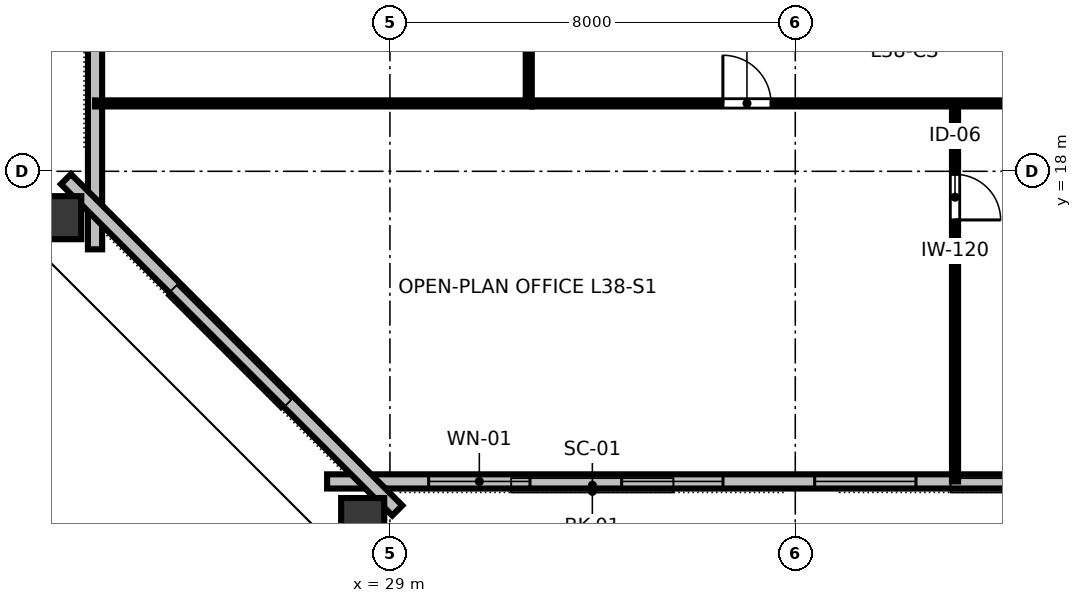
"""IFC4 building model, lengths in metres.
Left out: names, types, materials, properties, quantities, classifications, styles, units other than length and angle.
Written with IfcOpenShell. Run it as: python <this file> out.ifc"""

import sys

from ifc_helpers import new_model, si_unit, direction, frame, frame_2d, origin, origin_2d, place, context, subcontext, project, spatial, rectangle, hollow_rectangle, extrude, element, fill, save


model = new_model("IFC4")
c1 = context("Model", 3, precision=1e-05, world=origin(), true_north=direction((0.0, 1.0)))
c2 = subcontext(c1, "Body", "Model", "MODEL_VIEW")
j1 = project(units=[si_unit("LENGTHUNIT", "METRE"), si_unit("PLANEANGLEUNIT", "RADIAN")], contexts=[c1])
p1 = place(None, origin())
s1 = spatial("IfcSite", under=j1, at=p1, CompositionType="ELEMENT")
p2 = place(p1, origin())
s2 = spatial("IfcBuilding", under=s1, at=p2, CompositionType="ELEMENT")
p3 = place(p2, frame((0.0, 0.0, 145.6)))
s3 = spatial("IfcBuildingStorey", under=s2, at=p3, CompositionType="ELEMENT", Elevation=145.6)
p4 = place(p3, frame((28.462, 11.052, 0.0), z_axis=(-0.059277862286, -0.074043044101, 0.995491719033), x_axis=(0.780645414878, -0.624974188451, 0.0)))
e1 = element("IfcColumn", 1, at=p4, inside=s3, PredefinedType="COLUMN", context=c2, shape_type="SweptSolid", body=[
    extrude(hollow_rectangle(XDim=0.85, YDim=1.0, WallThickness=0.05, at=origin_2d()), origin(), (0.0, 0.0, 1.0), 3.373),
])
p5 = place(p3, frame((22.409, 17.085, 0.0), z_axis=(-0.088840732105, -0.044637403672, 0.995045137927), x_axis=(0.889124879538, 0.446734568954, 0.099424209766)))
e2 = element("IfcColumn", 2, at=p5, inside=s3, PredefinedType="COLUMN", context=c2, shape_type="SweptSolid", body=[
    extrude(hollow_rectangle(XDim=0.85, YDim=1.0, WallThickness=0.05, at=origin_2d()), origin(), (0.0, 0.0, 1.0), 3.375),
])
p6 = place(p3, frame((27.76, 11.88, 0.0), z_axis=(0.0, 0.0, 1.0), x_axis=(1.0, 0.0, 0.0)))
e3 = element("IfcWall", 3, at=p6, inside=s3, PredefinedType="STANDARD", context=c2, shape_type="SweptSolid", body=[
    extrude(rectangle(XDim=36.48, YDim=0.28, at=frame_2d((18.24, 0.0))), origin(), (0.0, 0.0, 1.0), 3.36),
])
p7 = place(p6, frame((2.004, 0.0, 0.8)))
e4 = element("IfcOpeningElement", 4, at=p7, cuts=e3, PredefinedType="OPENING", context=c2, shape_type="SweptSolid", body=[
    extrude(rectangle(XDim=2.0, YDim=1.95, at=frame_2d((1.0, 0.975))), frame((0.0, 0.15, 0.0), z_axis=(0.0, -1.0, 0.0), x_axis=(1.0, 0.0, 0.0)), (0.0, 0.0, 1.0), 0.3),
])
p8 = place(p6, frame((5.813, 0.0, 0.8)))
e5 = element("IfcOpeningElement", 5, at=p8, cuts=e3, PredefinedType="OPENING", context=c2, shape_type="SweptSolid", body=[
    extrude(rectangle(XDim=2.0, YDim=1.95, at=frame_2d((1.0, 0.975))), frame((0.0, 0.15, 0.0), z_axis=(0.0, -1.0, 0.0), x_axis=(1.0, 0.0, 0.0)), (0.0, 0.0, 1.0), 0.3),
])
p9 = place(p6, frame((9.622, 0.0, 0.8)))
e6 = element("IfcOpeningElement", 6, at=p9, cuts=e3, PredefinedType="OPENING", context=c2, shape_type="SweptSolid", body=[
    extrude(rectangle(XDim=2.0, YDim=1.95, at=frame_2d((1.0, 0.975))), frame((0.0, 0.15, 0.0), z_axis=(0.0, -1.0, 0.0), x_axis=(1.0, 0.0, 0.0)), (0.0, 0.0, 1.0), 0.3),
])
p10 = place(p6, frame((13.431, 0.0, 0.8)))
e7 = element("IfcOpeningElement", 7, at=p10, cuts=e3, PredefinedType="OPENING", context=c2, shape_type="SweptSolid", body=[
    extrude(rectangle(XDim=2.0, YDim=1.95, at=frame_2d((1.0, 0.975))), frame((0.0, 0.15, 0.0), z_axis=(0.0, -1.0, 0.0), x_axis=(1.0, 0.0, 0.0)), (0.0, 0.0, 1.0), 0.3),
])
p11 = place(p6, frame((21.049, 0.0, 0.8)))
e8 = element("IfcOpeningElement", 8, at=p11, cuts=e3, PredefinedType="OPENING", context=c2, shape_type="SweptSolid", body=[
    extrude(rectangle(XDim=2.0, YDim=1.95, at=frame_2d((1.0, 0.975))), frame((0.0, 0.15, 0.0), z_axis=(0.0, -1.0, 0.0), x_axis=(1.0, 0.0, 0.0)), (0.0, 0.0, 1.0), 0.3),
])
p12 = place(p6, frame((28.667, 0.0, 0.8)))
e9 = element("IfcOpeningElement", 9, at=p12, cuts=e3, PredefinedType="OPENING", context=c2, shape_type="SweptSolid", body=[
    extrude(rectangle(XDim=2.0, YDim=1.95, at=frame_2d((1.0, 0.975))), frame((0.0, 0.15, 0.0), z_axis=(0.0, -1.0, 0.0), x_axis=(1.0, 0.0, 0.0)), (0.0, 0.0, 1.0), 0.3),
])
p13 = place(p6, frame((32.476, 0.0, 0.8)))
e10 = element("IfcOpeningElement", 10, at=p13, cuts=e3, PredefinedType="OPENING", context=c2, shape_type="SweptSolid", body=[
    extrude(rectangle(XDim=2.0, YDim=1.95, at=frame_2d((1.0, 0.975))), frame((0.0, 0.15, 0.0), z_axis=(0.0, -1.0, 0.0), x_axis=(1.0, 0.0, 0.0)), (0.0, 0.0, 1.0), 0.3),
])
p14 = place(p3, frame((23.18, 47.54, 0.0), z_axis=(0.0, 0.0, 1.0), x_axis=(0.0, -1.0, 0.0)))
e11 = element("IfcWall", 11, at=p14, inside=s3, PredefinedType="STANDARD", context=c2, shape_type="SweptSolid", body=[
    extrude(rectangle(XDim=31.08, YDim=0.28, at=frame_2d((15.54, 0.0))), origin(), (0.0, 0.0, 1.0), 3.36),
])
p15 = place(p14, frame((11.86, 0.0, 0.0)))
e12 = element("IfcOpeningElement", 12, at=p15, cuts=e11, PredefinedType="OPENING", context=c2, shape_type="SweptSolid", body=[
    extrude(rectangle(XDim=1.4, YDim=2.15, at=frame_2d((0.7, 1.075))), frame((0.0, 0.15, 0.0), z_axis=(0.0, -1.0, 0.0), x_axis=(1.0, 0.0, 0.0)), (0.0, 0.0, 1.0), 0.3),
])
p16 = place(p14, frame((5.515, 0.0, 0.8)))
e13 = element("IfcOpeningElement", 13, at=p16, cuts=e11, PredefinedType="OPENING", context=c2, shape_type="SweptSolid", body=[
    extrude(rectangle(XDim=2.0, YDim=1.95, at=frame_2d((1.0, 0.975))), frame((0.0, 0.15, 0.0), z_axis=(0.0, -1.0, 0.0), x_axis=(1.0, 0.0, 0.0)), (0.0, 0.0, 1.0), 0.3),
])
p17 = place(p14, frame((9.125, 0.0, 0.8)))
e14 = element("IfcOpeningElement", 14, at=p17, cuts=e11, PredefinedType="OPENING", context=c2, shape_type="SweptSolid", body=[
    extrude(rectangle(XDim=2.0, YDim=1.95, at=frame_2d((1.0, 0.975))), frame((0.0, 0.15, 0.0), z_axis=(0.0, -1.0, 0.0), x_axis=(1.0, 0.0, 0.0)), (0.0, 0.0, 1.0), 0.3),
])
p18 = place(p14, frame((19.955, 0.0, 0.8)))
e15 = element("IfcOpeningElement", 15, at=p18, cuts=e11, PredefinedType="OPENING", context=c2, shape_type="SweptSolid", body=[
    extrude(rectangle(XDim=2.0, YDim=1.95, at=frame_2d((1.0, 0.975))), frame((0.0, 0.15, 0.0), z_axis=(0.0, -1.0, 0.0), x_axis=(1.0, 0.0, 0.0)), (0.0, 0.0, 1.0), 0.3),
])
p19 = place(p14, frame((23.565, 0.0, 0.8)))
e16 = element("IfcOpeningElement", 16, at=p19, cuts=e11, PredefinedType="OPENING", context=c2, shape_type="SweptSolid", body=[
    extrude(rectangle(XDim=2.0, YDim=1.95, at=frame_2d((1.0, 0.975))), frame((0.0, 0.15, 0.0), z_axis=(0.0, -1.0, 0.0), x_axis=(1.0, 0.0, 0.0)), (0.0, 0.0, 1.0), 0.3),
])
p20 = place(p3, frame((22.606, 17.845, 0.0), z_axis=(0.0, 0.0, 1.0), x_axis=(0.707106781187, -0.707106781187, 0.0)))
e17 = element("IfcWall", 17, at=p20, inside=s3, PredefinedType="STANDARD", context=c2, shape_type="SweptSolid", body=[
    extrude(rectangle(XDim=9.248, YDim=0.28, at=frame_2d((4.624, 0.0))), origin(), (0.0, 0.0, 1.0), 3.36),
])
p21 = place(p3, frame((40.152, 19.34, 0.0), z_axis=(0.0, 0.0, 1.0), x_axis=(0.0, -1.0, 0.0)))
e18 = element("IfcWall", 18, at=p21, inside=s3, PredefinedType="PARTITIONING", context=c2, shape_type="SweptSolid", body=[
    extrude(rectangle(XDim=7.46, YDim=0.12, at=frame_2d((3.73, 0.0))), origin(), (0.0, 0.0, 1.0), 2.64),
])
p22 = place(p21, frame((1.4, 0.0, 0.0)))
e19 = element("IfcOpeningElement", 19, at=p22, cuts=e18, PredefinedType="OPENING", context=c2, shape_type="SweptSolid", body=[
    extrude(rectangle(XDim=0.9, YDim=2.15, at=frame_2d((0.45, 1.075))), frame((0.0, 0.07, 0.0), z_axis=(0.0, -1.0, 0.0), x_axis=(1.0, 0.0, 0.0)), (0.0, 0.0, 1.0), 0.14),
])
p23 = place(p3, frame((31.8, 19.34, 0.0), z_axis=(0.0, 0.0, 1.0), x_axis=(1.0, 0.0, 0.0)))
e20 = element("IfcWall", 20, at=p23, inside=s3, PredefinedType="PARTITIONING", context=c2, shape_type="SweptSolid", body=[
    extrude(rectangle(XDim=28.4, YDim=0.12, at=frame_2d((14.2, 0.0))), origin(), (0.0, 0.0, 1.0), 2.64),
])
p24 = place(p23, frame((3.771, 0.0, 0.0)))
e21 = element("IfcOpeningElement", 21, at=p24, cuts=e20, PredefinedType="OPENING", context=c2, shape_type="SweptSolid", body=[
    extrude(rectangle(XDim=0.95, YDim=2.15, at=frame_2d((0.475, 1.075))), frame((0.0, 0.07, 0.0), z_axis=(0.0, -1.0, 0.0), x_axis=(1.0, 0.0, 0.0)), (0.0, 0.0, 1.0), 0.14),
])
p25 = place(p23, frame((10.068, 0.0, 0.0)))
e22 = element("IfcOpeningElement", 22, at=p25, cuts=e20, PredefinedType="OPENING", context=c2, shape_type="SweptSolid", body=[
    extrude(rectangle(XDim=0.95, YDim=2.15, at=frame_2d((0.475, 1.075))), frame((0.0, 0.07, 0.0), z_axis=(0.0, -1.0, 0.0), x_axis=(1.0, 0.0, 0.0)), (0.0, 0.0, 1.0), 0.14),
])
p26 = place(p23, frame((13.828, 0.0, 0.0)))
e23 = element("IfcOpeningElement", 23, at=p26, cuts=e20, PredefinedType="OPENING", context=c2, shape_type="SweptSolid", body=[
    extrude(rectangle(XDim=0.95, YDim=2.15, at=frame_2d((0.475, 1.075))), frame((0.0, 0.07, 0.0), z_axis=(0.0, -1.0, 0.0), x_axis=(1.0, 0.0, 0.0)), (0.0, 0.0, 1.0), 0.14),
])
p27 = place(p23, frame((18.648, 0.0, 0.0)))
e24 = element("IfcOpeningElement", 24, at=p27, cuts=e20, PredefinedType="OPENING", context=c2, shape_type="SweptSolid", body=[
    extrude(rectangle(XDim=0.95, YDim=2.15, at=frame_2d((0.475, 1.075))), frame((0.0, 0.07, 0.0), z_axis=(0.0, -1.0, 0.0), x_axis=(1.0, 0.0, 0.0)), (0.0, 0.0, 1.0), 0.14),
])
p28 = place(p23, frame((24.842, 0.0, 0.0)))
e25 = element("IfcOpeningElement", 25, at=p28, cuts=e20, PredefinedType="OPENING", context=c2, shape_type="SweptSolid", body=[
    extrude(rectangle(XDim=0.95, YDim=2.15, at=frame_2d((0.475, 1.075))), frame((0.0, 0.07, 0.0), z_axis=(0.0, -1.0, 0.0), x_axis=(1.0, 0.0, 0.0)), (0.0, 0.0, 1.0), 0.14),
])
p29 = place(p3, frame((31.74, 19.4, 0.0), z_axis=(0.0, 0.0, 1.0), x_axis=(0.0, 1.0, 0.0)))
e26 = element("IfcWall", 26, at=p29, inside=s3, PredefinedType="PARTITIONING", context=c2, shape_type="SweptSolid", body=[
    extrude(rectangle(XDim=11.58, YDim=0.12, at=frame_2d((5.79, 0.0))), origin(), (0.0, 0.0, 1.0), 2.64),
])
p30 = place(p29, frame((4.868, 0.0, 0.0)))
e27 = element("IfcOpeningElement", 27, at=p30, cuts=e26, PredefinedType="OPENING", context=c2, shape_type="SweptSolid", body=[
    extrude(rectangle(XDim=0.95, YDim=2.15, at=frame_2d((0.475, 1.075))), frame((0.0, 0.07, 0.0), z_axis=(0.0, -1.0, 0.0), x_axis=(1.0, 0.0, 0.0)), (0.0, 0.0, 1.0), 0.14),
])
p31 = place(p3, frame((31.8, 19.34, 0.0), z_axis=(0.0, 0.0, 1.0), x_axis=(-1.0, 0.0, 0.0)))
e28 = element("IfcWall", 28, at=p31, inside=s3, PredefinedType="PARTITIONING", context=c2, shape_type="SweptSolid", body=[
    extrude(rectangle(XDim=8.62, YDim=0.12, at=frame_2d((4.31, 0.0))), origin(), (0.0, 0.0, 1.0), 2.64),
])
p32 = place(p7, origin())
e29 = element("IfcWindow", 29, at=p32, inside=s3, PartitioningType="SINGLE_PANEL", PredefinedType="WINDOW", context=c2, shape_type="SweptSolid", body=[
    extrude(rectangle(XDim=2.0, YDim=1.95, at=frame_2d((1.0, 0.975))), frame((0.0, 0.03, 0.0), z_axis=(0.0, -1.0, 0.0), x_axis=(1.0, 0.0, 0.0)), (0.0, 0.0, 1.0), 0.06),
])
fill(e4, e29)
p33 = place(p8, origin())
e30 = element("IfcWindow", 30, at=p33, inside=s3, PartitioningType="SINGLE_PANEL", PredefinedType="WINDOW", context=c2, shape_type="SweptSolid", body=[
    extrude(rectangle(XDim=2.0, YDim=1.95, at=frame_2d((1.0, 0.975))), frame((0.0, 0.03, 0.0), z_axis=(0.0, -1.0, 0.0), x_axis=(1.0, 0.0, 0.0)), (0.0, 0.0, 1.0), 0.06),
])
fill(e5, e30)
p34 = place(p9, origin())
e31 = element("IfcWindow", 31, at=p34, inside=s3, PartitioningType="SINGLE_PANEL", PredefinedType="WINDOW", context=c2, shape_type="SweptSolid", body=[
    extrude(rectangle(XDim=2.0, YDim=1.95, at=frame_2d((1.0, 0.975))), frame((0.0, 0.03, 0.0), z_axis=(0.0, -1.0, 0.0), x_axis=(1.0, 0.0, 0.0)), (0.0, 0.0, 1.0), 0.06),
])
fill(e6, e31)
p35 = place(p22, origin())
e32 = element("IfcDoor", 32, at=p35, inside=s3, OperationType="SINGLE_SWING_RIGHT", PredefinedType="DOOR", context=c2, shape_type="SweptSolid", body=[
    extrude(rectangle(XDim=0.9, YDim=2.15, at=frame_2d((0.45, 1.075))), frame((0.0, 0.025, 0.0), z_axis=(0.0, -1.0, 0.0), x_axis=(1.0, 0.0, 0.0)), (0.0, 0.0, 1.0), 0.05),
])
fill(e19, e32)
p36 = place(p24, origin())
e33 = element("IfcDoor", 33, at=p36, inside=s3, OperationType="SINGLE_SWING_LEFT", PredefinedType="DOOR", context=c2, shape_type="SweptSolid", body=[
    extrude(rectangle(XDim=0.95, YDim=2.15, at=frame_2d((0.475, 1.075))), frame((0.0, 0.025, 0.0), z_axis=(0.0, -1.0, 0.0), x_axis=(1.0, 0.0, 0.0)), (0.0, 0.0, 1.0), 0.05),
])
fill(e21, e33)
save(model, sys.argv[1])
